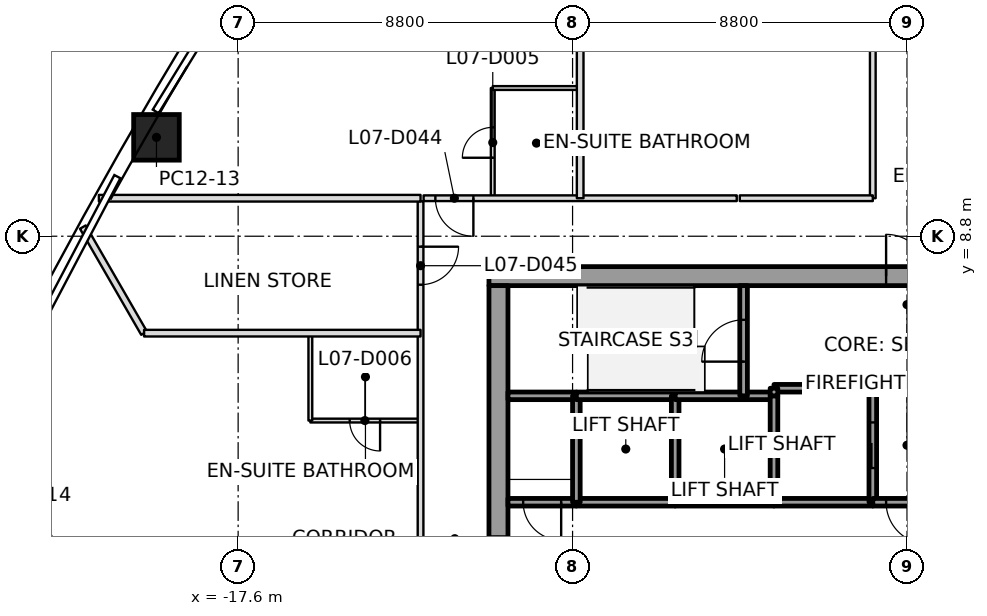
"""IFC4 building model, lengths in metres.
Left out: names, types, materials, properties, quantities, classifications, styles, units other than length and angle.
Written with IfcOpenShell. Run it as: python <this file> out.ifc"""

import sys

from ifc_helpers import new_model, si_unit, direction, frame, frame_2d, origin, origin_2d, place, context, subcontext, project, spatial, rectangle, extrude, clip, halfspace, element, fill, save


model = new_model("IFC4")
c1 = context("Model", 3, precision=1e-05, world=origin(), true_north=direction((0.0, 1.0)))
c2 = subcontext(c1, "Body", "Model", "MODEL_VIEW")
j1 = project(units=[si_unit("LENGTHUNIT", "METRE"), si_unit("PLANEANGLEUNIT", "RADIAN")], contexts=[c1])
p1 = place(None, origin())
s1 = spatial("IfcSite", under=j1, at=p1, CompositionType="ELEMENT")
p2 = place(p1, origin())
s2 = spatial("IfcBuilding", under=s1, at=p2, CompositionType="ELEMENT")
p3 = place(p2, frame((0.0, 0.0, 48.0)))
s3 = spatial("IfcBuildingStorey", under=s2, at=p3, CompositionType="ELEMENT", Elevation=48.0)
p4 = place(p3, frame((-19.749, 11.402, 0.0), z_axis=(0.010688729499, -0.00613612249, 0.999924046647), x_axis=(0.49997143695, 0.866041893524, -2.9922579e-05)))
e1 = element("IfcColumn", 1, at=p4, inside=s3, PredefinedType="COLUMN", context=c2, shape_type="SweptSolid", body=[
    clip(extrude(rectangle(XDim=1.2, YDim=1.2, at=origin_2d()), origin(), (0.0, 0.0, 1.0), 3.7), halfspace(frame((0.0, 0.0, 0.002)), True)),
])
p5 = place(p3, frame((-11.0, 7.75, 0.0), z_axis=(0.0, 0.0, 1.0), x_axis=(1.0, 0.0, 0.0)))
e2 = element("IfcWall", 2, at=p5, inside=s3, PredefinedType="SHEAR", context=c2, shape_type="SweptSolid", body=[
    extrude(rectangle(XDim=22.0, YDim=0.5, at=frame_2d((11.0, 0.0))), origin(), (0.0, 0.0, 1.0), 3.7),
])
p6 = place(p5, frame((10.45, 0.0, 0.0)))
e3 = element("IfcOpeningElement", 3, at=p6, cuts=e2, PredefinedType="OPENING", context=c2, shape_type="SweptSolid", body=[
    extrude(rectangle(XDim=1.1, YDim=2.1, at=frame_2d((0.55, 1.05))), frame((0.0, 0.25, 0.0), z_axis=(0.0, -1.0, 0.0), x_axis=(1.0, 0.0, 0.0)), (0.0, 0.0, 1.0), 0.5),
])
p7 = place(p3, frame((-10.75, -7.5, 0.0), z_axis=(0.0, 0.0, 1.0), x_axis=(0.0, 1.0, 0.0)))
e4 = element("IfcWall", 4, at=p7, inside=s3, PredefinedType="SHEAR", context=c2, shape_type="SweptSolid", body=[
    extrude(rectangle(XDim=15.0, YDim=0.5, at=frame_2d((7.5, 0.0))), origin(), (0.0, 0.0, 1.0), 3.7),
])
p8 = place(p7, frame((6.6, 0.0, 0.0)))
e5 = element("IfcOpeningElement", 5, at=p8, cuts=e4, PredefinedType="OPENING", context=c2, shape_type="SweptSolid", body=[
    extrude(rectangle(XDim=1.8, YDim=2.1, at=frame_2d((0.9, 1.05))), frame((0.0, 0.25, 0.0), z_axis=(0.0, -1.0, 0.0), x_axis=(1.0, 0.0, 0.0)), (0.0, 0.0, 1.0), 0.5),
])
p9 = place(p3, frame((-8.7, 1.8, 0.0), z_axis=(0.0, 0.0, 1.0), x_axis=(-1.0, 0.0, 0.0)))
e6 = element("IfcWall", 6, at=p9, inside=s3, PredefinedType="SOLIDWALL", context=c2, shape_type="SweptSolid", body=[
    extrude(rectangle(XDim=1.8, YDim=0.2, at=frame_2d((0.9, 0.0))), origin(), (0.0, 0.0, 1.0), 3.55),
])
p10 = place(p9, frame((0.4, 0.0, 0.0)))
e7 = element("IfcOpeningElement", 7, at=p10, cuts=e6, PredefinedType="OPENING", context=c2, shape_type="SweptSolid", body=[
    extrude(rectangle(XDim=1.0, YDim=2.1, at=frame_2d((0.5, 1.05))), frame((0.0, 0.1, 0.0), z_axis=(0.0, -1.0, 0.0), x_axis=(1.0, 0.0, 0.0)), (0.0, 0.0, 1.0), 0.2),
])
p11 = place(p3, frame((-8.7, 4.6, 0.0), z_axis=(0.0, 0.0, 1.0), x_axis=(-1.0, 0.0, 0.0)))
e8 = element("IfcWall", 8, at=p11, inside=s3, PredefinedType="SOLIDWALL", context=c2, shape_type="SweptSolid", body=[
    extrude(rectangle(XDim=1.8, YDim=0.2, at=frame_2d((0.9, 0.0))), origin(), (0.0, 0.0, 1.0), 3.55),
])
p12 = place(p3, frame((-6.1, 1.8, 0.0), z_axis=(0.0, 0.0, 1.0), x_axis=(-1.0, 0.0, 0.0)))
e9 = element("IfcWall", 9, at=p12, inside=s3, PredefinedType="SOLIDWALL", context=c2, shape_type="SweptSolid", body=[
    extrude(rectangle(XDim=2.6, YDim=0.2, at=frame_2d((1.3, 0.0))), origin(), (0.0, 0.0, 1.0), 3.55),
])
p13 = place(p3, frame((-8.7, 1.8, 0.0), z_axis=(0.0, 0.0, 1.0), x_axis=(0.0, 1.0, 0.0)))
e10 = element("IfcWall", 10, at=p13, inside=s3, PredefinedType="SOLIDWALL", context=c2, shape_type="SweptSolid", body=[
    extrude(rectangle(XDim=2.8, YDim=0.2, at=frame_2d((1.4, 0.0))), origin(), (0.0, 0.0, 1.0), 3.55),
])
p14 = place(p3, frame((-6.1, 4.6, 0.0), z_axis=(0.0, 0.0, 1.0), x_axis=(-1.0, 0.0, 0.0)))
e11 = element("IfcWall", 11, at=p14, inside=s3, PredefinedType="SOLIDWALL", context=c2, shape_type="SweptSolid", body=[
    extrude(rectangle(XDim=2.6, YDim=0.2, at=frame_2d((1.3, 0.0))), origin(), (0.0, 0.0, 1.0), 3.55),
])
p15 = place(p3, frame((-3.5, 1.8, 0.0), z_axis=(0.0, 0.0, 1.0), x_axis=(-1.0, 0.0, 0.0)))
e12 = element("IfcWall", 12, at=p15, inside=s3, PredefinedType="SOLIDWALL", context=c2, shape_type="SweptSolid", body=[
    extrude(rectangle(XDim=2.6, YDim=0.2, at=frame_2d((1.3, 0.0))), origin(), (0.0, 0.0, 1.0), 3.55),
])
p16 = place(p3, frame((-6.1, 1.8, 0.0), z_axis=(0.0, 0.0, 1.0), x_axis=(0.0, 1.0, 0.0)))
e13 = element("IfcWall", 13, at=p16, inside=s3, PredefinedType="SOLIDWALL", context=c2, shape_type="SweptSolid", body=[
    extrude(rectangle(XDim=2.8, YDim=0.2, at=frame_2d((1.4, 0.0))), origin(), (0.0, 0.0, 1.0), 3.55),
])
p17 = place(p3, frame((-4.3, 4.6, 0.0), z_axis=(0.0, 0.0, 1.0), x_axis=(-1.0, 0.0, 0.0)))
e14 = element("IfcWall", 14, at=p17, inside=s3, PredefinedType="SOLIDWALL", context=c2, shape_type="SweptSolid", body=[
    extrude(rectangle(XDim=1.8, YDim=0.2, at=frame_2d((0.9, 0.0))), origin(), (0.0, 0.0, 1.0), 3.55),
])
p18 = place(p3, frame((-3.5, 4.6, 0.0), z_axis=(0.0, 0.0, 1.0), x_axis=(-1.0, 0.0, 0.0)))
e15 = element("IfcWall", 15, at=p18, inside=s3, PredefinedType="SOLIDWALL", context=c2, shape_type="SweptSolid", body=[
    extrude(rectangle(XDim=0.8, YDim=0.2, at=frame_2d((0.4, 0.0))), origin(), (0.0, 0.0, 1.0), 3.55),
])
p19 = place(p3, frame((-4.3, 4.6, 0.0), z_axis=(0.0, 0.0, 1.0), x_axis=(0.0, 1.0, 0.0)))
e16 = element("IfcWall", 16, at=p19, inside=s3, PredefinedType="SOLIDWALL", context=c2, shape_type="SweptSolid", body=[
    extrude(rectangle(XDim=2.9, YDim=0.2, at=frame_2d((1.45, 0.0))), origin(), (0.0, 0.0, 1.0), 3.55),
])
p20 = place(p19, frame((0.9, 0.0, 0.0)))
e17 = element("IfcOpeningElement", 17, at=p20, cuts=e16, PredefinedType="OPENING", context=c2, shape_type="SweptSolid", body=[
    extrude(rectangle(XDim=1.1, YDim=2.1, at=frame_2d((0.55, 1.05))), frame((0.0, 0.1, 0.0), z_axis=(0.0, -1.0, 0.0), x_axis=(1.0, 0.0, 0.0)), (0.0, 0.0, 1.0), 0.2),
])
p21 = place(p3, frame((-0.9, 1.8, 0.0), z_axis=(0.0, 0.0, 1.0), x_axis=(-1.0, 0.0, 0.0)))
e18 = element("IfcWall", 18, at=p21, inside=s3, PredefinedType="SOLIDWALL", context=c2, shape_type="SweptSolid", body=[
    extrude(rectangle(XDim=2.6, YDim=0.2, at=frame_2d((1.3, 0.0))), origin(), (0.0, 0.0, 1.0), 3.55),
])
p22 = place(p3, frame((-3.5, 4.6, 0.0), z_axis=(0.0, 0.0, 1.0), x_axis=(0.0, -1.0, 0.0)))
e19 = element("IfcWall", 19, at=p22, inside=s3, PredefinedType="SOLIDWALL", context=c2, shape_type="SweptSolid", body=[
    extrude(rectangle(XDim=2.8, YDim=0.2, at=frame_2d((1.4, 0.0))), origin(), (0.0, 0.0, 1.0), 3.55),
])
p23 = place(p3, frame((-0.9, 1.8, 0.0), z_axis=(0.0, 0.0, 1.0), x_axis=(0.0, 1.0, 0.0)))
e20 = element("IfcWall", 20, at=p23, inside=s3, PredefinedType="SOLIDWALL", context=c2, shape_type="SweptSolid", body=[
    extrude(rectangle(XDim=3.0, YDim=0.2, at=frame_2d((1.5, 0.0))), origin(), (0.0, 0.0, 1.0), 3.55),
])
p24 = place(p23, frame((0.9, 0.0, 0.0)))
e21 = element("IfcOpeningElement", 21, at=p24, cuts=e20, PredefinedType="OPENING", context=c2, shape_type="SweptSolid", body=[
    extrude(rectangle(XDim=1.2, YDim=2.1, at=frame_2d((0.6, 1.05))), frame((0.0, 0.1, 0.0), z_axis=(0.0, -1.0, 0.0), x_axis=(1.0, 0.0, 0.0)), (0.0, 0.0, 1.0), 0.2),
])
p25 = place(p3, frame((-0.9, 4.8, 0.0), z_axis=(0.0, 0.0, 1.0), x_axis=(-1.0, 0.0, 0.0)))
e22 = element("IfcWall", 22, at=p25, inside=s3, PredefinedType="SOLIDWALL", context=c2, shape_type="SweptSolid", body=[
    extrude(rectangle(XDim=2.6, YDim=0.2, at=frame_2d((1.3, 0.0))), origin(), (0.0, 0.0, 1.0), 3.55),
])
p26 = place(p3, frame((-3.5, 4.8, 0.0), z_axis=(0.0, 0.0, 1.0), x_axis=(0.0, -1.0, 0.0)))
e23 = element("IfcWall", 23, at=p26, inside=s3, PredefinedType="SOLIDWALL", context=c2, shape_type="SweptSolid", body=[
    extrude(rectangle(XDim=0.2, YDim=0.2, at=frame_2d((0.1, 0.0))), origin(), (0.0, 0.0, 1.0), 3.55),
])
p27 = place(p3, frame((0.9, 1.8, 0.0), z_axis=(0.0, 0.0, 1.0), x_axis=(-1.0, 0.0, 0.0)))
e24 = element("IfcWall", 24, at=p27, inside=s3, PredefinedType="SOLIDWALL", context=c2, shape_type="SweptSolid", body=[
    extrude(rectangle(XDim=1.8, YDim=0.2, at=frame_2d((0.9, 0.0))), origin(), (0.0, 0.0, 1.0), 3.55),
])
p28 = place(p27, frame((0.35, 0.0, 0.0)))
e25 = element("IfcOpeningElement", 25, at=p28, cuts=e24, PredefinedType="OPENING", context=c2, shape_type="SweptSolid", body=[
    extrude(rectangle(XDim=1.1, YDim=2.1, at=frame_2d((0.55, 1.05))), frame((0.0, 0.1, 0.0), z_axis=(0.0, -1.0, 0.0), x_axis=(1.0, 0.0, 0.0)), (0.0, 0.0, 1.0), 0.2),
])
p29 = place(p3, frame((-17.213, -8.899, 0.0), z_axis=(0.0, 0.0, 1.0), x_axis=(-0.482265023756, 0.876025368846, 0.0)))
e26 = element("IfcWall", 26, at=p29, inside=s3, PredefinedType="PARTITIONING", context=c2, shape_type="SweptSolid", body=[
    extrude(rectangle(XDim=14.424, YDim=0.175, at=frame_2d((7.212, 0.0))), origin(), (0.0, 0.0, 1.0), 2.947),
])
p30 = place(p3, frame((-21.686, 9.041, 0.0), z_axis=(0.0, 0.0, 1.0), x_axis=(0.499975971767, -0.866039276047, 0.0)))
e27 = element("IfcWall", 27, at=p30, inside=s3, PredefinedType="PARTITIONING", context=c2, shape_type="SweptSolid", body=[
    extrude(rectangle(XDim=3.223, YDim=0.175, at=frame_2d((1.612, 0.0))), origin(), (0.0, 0.0, 1.0), 2.934),
])
p31 = place(p3, frame((-20.075, 6.249, 0.0), z_axis=(0.0, 0.0, 1.0), x_axis=(1.0, 0.0, 0.0)))
e28 = element("IfcWall", 28, at=p31, inside=s3, PredefinedType="PARTITIONING", context=c2, shape_type="SweptSolid", body=[
    extrude(rectangle(XDim=7.275, YDim=0.175, at=frame_2d((3.637, 0.0))), origin(), (0.0, 0.0, 1.0), 3.093),
])
p32 = place(p3, frame((-12.8, 9.8, 0.0), z_axis=(0.0, 0.0, 1.0), x_axis=(-1.0, 0.0, 0.0)))
e29 = element("IfcWall", 29, at=p32, inside=s3, PredefinedType="PARTITIONING", context=c2, shape_type="SweptSolid", body=[
    extrude(rectangle(XDim=8.464, YDim=0.175, at=frame_2d((4.232, 0.0))), origin(), (0.0, 0.0, 1.0), 2.934),
])
p33 = place(p3, frame((-8.6, 9.8, 0.0), z_axis=(0.0, 0.0, 1.0), x_axis=(0.0, 1.0, 0.0)))
e30 = element("IfcWall", 30, at=p33, inside=s3, PredefinedType="PARTITIONING", context=c2, shape_type="SweptSolid", body=[
    extrude(rectangle(XDim=18.995, YDim=0.175, at=frame_2d((9.497, 0.0))), origin(), (0.0, 0.0, 1.0), 2.934),
])
p34 = place(p3, frame((-12.8, 9.72, 0.0), z_axis=(0.0, 0.0, 1.0), x_axis=(0.0, -1.0, 0.0)))
e31 = element("IfcWall", 31, at=p34, inside=s3, PredefinedType="PARTITIONING", context=c2, shape_type="SweptSolid", body=[
    extrude(rectangle(XDim=16.071, YDim=0.15, at=frame_2d((8.035, 0.0))), origin(), (0.0, 0.0, 1.0), 3.017),
])
p35 = place(p34, frame((1.195, 0.0, 0.0)))
e32 = element("IfcOpeningElement", 32, at=p35, cuts=e31, PredefinedType="OPENING", context=c2, shape_type="SweptSolid", body=[
    extrude(rectangle(XDim=1.0, YDim=2.1, at=frame_2d((0.5, 1.05))), frame((0.0, 0.075, 0.0), z_axis=(0.0, -1.0, 0.0), x_axis=(1.0, 0.0, 0.0)), (0.0, 0.0, 1.0), 0.15),
])
p36 = place(p34, frame((10.471, 0.0, 0.0)))
e33 = element("IfcOpeningElement", 33, at=p36, cuts=e31, PredefinedType="OPENING", context=c2, shape_type="SweptSolid", body=[
    extrude(rectangle(XDim=1.0, YDim=2.1, at=frame_2d((0.5, 1.05))), frame((0.0, 0.075, 0.0), z_axis=(0.0, -1.0, 0.0), x_axis=(1.0, 0.0, 0.0)), (0.0, 0.0, 1.0), 0.15),
])
p37 = place(p3, frame((-4.48, 9.8, 0.0), z_axis=(0.0, 0.0, 1.0), x_axis=(-1.0, 0.0, 0.0)))
e34 = element("IfcWall", 34, at=p37, inside=s3, PredefinedType="PARTITIONING", context=c2, shape_type="SweptSolid", body=[
    extrude(rectangle(XDim=8.24, YDim=0.15, at=frame_2d((4.12, 0.0))), origin(), (0.0, 0.0, 1.0), 3.017),
])
p38 = place(p37, frame((6.93, 0.0, 0.0)))
e35 = element("IfcOpeningElement", 35, at=p38, cuts=e34, PredefinedType="OPENING", context=c2, shape_type="SweptSolid", body=[
    extrude(rectangle(XDim=1.0, YDim=2.1, at=frame_2d((0.5, 1.05))), frame((0.0, 0.075, 0.0), z_axis=(0.0, -1.0, 0.0), x_axis=(1.0, 0.0, 0.0)), (0.0, 0.0, 1.0), 0.15),
])
p39 = place(p3, frame((-0.9, 27.756, 0.0), z_axis=(0.0, 0.0, 1.0), x_axis=(0.0, -1.0, 0.0)))
e36 = element("IfcWall", 36, at=p39, inside=s3, PredefinedType="PARTITIONING", context=c2, shape_type="SweptSolid", body=[
    extrude(rectangle(XDim=17.956, YDim=0.15, at=frame_2d((8.978, 0.0))), origin(), (0.0, 0.0, 1.0), 2.947),
])
p40 = place(p39, frame((9.678, 0.0, 0.0)))
e37 = element("IfcOpeningElement", 37, at=p40, cuts=e36, PredefinedType="OPENING", context=c2, shape_type="SweptSolid", body=[
    extrude(rectangle(XDim=1.0, YDim=2.1, at=frame_2d((0.5, 1.05))), frame((0.0, 0.075, 0.0), z_axis=(0.0, -1.0, 0.0), x_axis=(1.0, 0.0, 0.0)), (0.0, 0.0, 1.0), 0.15),
])
p41 = place(p3, frame((-0.9, 9.8, 0.0), z_axis=(0.0, 0.0, 1.0), x_axis=(-1.0, 0.0, 0.0)))
e38 = element("IfcWall", 38, at=p41, inside=s3, PredefinedType="PARTITIONING", context=c2, shape_type="SweptSolid", body=[
    extrude(rectangle(XDim=3.5, YDim=0.15, at=frame_2d((1.75, 0.0))), origin(), (0.0, 0.0, 1.0), 2.947),
])
p42 = place(p3, frame((-12.83, 3.949, 0.0), z_axis=(0.0, 0.0, 1.0), x_axis=(-1.0, 0.0, 0.0)))
e39 = element("IfcWall", 39, at=p42, inside=s3, PredefinedType="PARTITIONING", context=c2, shape_type="SweptSolid", body=[
    extrude(rectangle(XDim=2.87, YDim=0.1, at=frame_2d((1.435, 0.0))), origin(), (0.0, 0.0, 1.0), 3.093),
])
p43 = place(p42, frame((1.035, 0.0, 0.0)))
e40 = element("IfcOpeningElement", 40, at=p43, cuts=e39, PredefinedType="OPENING", context=c2, shape_type="SweptSolid", body=[
    extrude(rectangle(XDim=0.8, YDim=2.1, at=frame_2d((0.4, 1.05))), frame((0.0, 0.05, 0.0), z_axis=(0.0, -1.0, 0.0), x_axis=(1.0, 0.0, 0.0)), (0.0, 0.0, 1.0), 0.1),
])
p44 = place(p3, frame((-15.7, 3.949, 0.0), z_axis=(0.0, 0.0, 1.0), x_axis=(0.0, 1.0, 0.0)))
e41 = element("IfcWall", 41, at=p44, inside=s3, PredefinedType="PARTITIONING", context=c2, shape_type="SweptSolid", body=[
    extrude(rectangle(XDim=2.27, YDim=0.1, at=frame_2d((1.135, 0.0))), origin(), (0.0, 0.0, 1.0), 3.093),
])
p45 = place(p3, frame((-10.9, 9.83, 0.0), z_axis=(0.0, 0.0, 1.0), x_axis=(0.0, 1.0, 0.0)))
e42 = element("IfcWall", 42, at=p45, inside=s3, PredefinedType="PARTITIONING", context=c2, shape_type="SweptSolid", body=[
    extrude(rectangle(XDim=2.87, YDim=0.1, at=frame_2d((1.435, 0.0))), origin(), (0.0, 0.0, 1.0), 3.017),
])
p46 = place(p45, frame((1.035, 0.0, 0.0)))
e43 = element("IfcOpeningElement", 43, at=p46, cuts=e42, PredefinedType="OPENING", context=c2, shape_type="SweptSolid", body=[
    extrude(rectangle(XDim=0.8, YDim=2.1, at=frame_2d((0.4, 1.05))), frame((0.0, 0.05, 0.0), z_axis=(0.0, -1.0, 0.0), x_axis=(1.0, 0.0, 0.0)), (0.0, 0.0, 1.0), 0.1),
])
p47 = place(p3, frame((-10.9, 12.7, 0.0), z_axis=(0.0, 0.0, 1.0), x_axis=(1.0, 0.0, 0.0)))
e44 = element("IfcWall", 44, at=p47, inside=s3, PredefinedType="PARTITIONING", context=c2, shape_type="SweptSolid", body=[
    extrude(rectangle(XDim=2.27, YDim=0.1, at=frame_2d((1.135, 0.0))), origin(), (0.0, 0.0, 1.0), 2.947),
])
p48 = place(p38, origin())
e45 = element("IfcDoor", 45, at=p48, inside=s3, OperationType="SINGLE_SWING_LEFT", PredefinedType="DOOR", context=c2, shape_type="SweptSolid", body=[
    extrude(rectangle(XDim=1.0, YDim=2.1, at=frame_2d((0.5, 1.05))), frame((0.0, 0.025, 0.0), z_axis=(0.0, -1.0, 0.0), x_axis=(1.0, 0.0, 0.0)), (0.0, 0.0, 1.0), 0.05),
])
fill(e35, e45)
p49 = place(p46, origin())
e46 = element("IfcDoor", 46, at=p49, inside=s3, OperationType="SINGLE_SWING_RIGHT", PredefinedType="DOOR", context=c2, shape_type="SweptSolid", body=[
    extrude(rectangle(XDim=0.8, YDim=2.1, at=frame_2d((0.4, 1.05))), frame((0.0, 0.025, 0.0), z_axis=(0.0, -1.0, 0.0), x_axis=(1.0, 0.0, 0.0)), (0.0, 0.0, 1.0), 0.05),
])
fill(e43, e46)
p50 = place(p35, origin())
e47 = element("IfcDoor", 47, at=p50, inside=s3, OperationType="SINGLE_SWING_LEFT", PredefinedType="DOOR", context=c2, shape_type="SweptSolid", body=[
    extrude(rectangle(XDim=1.0, YDim=2.1, at=frame_2d((0.5, 1.05))), frame((0.0, 0.025, 0.0), z_axis=(0.0, -1.0, 0.0), x_axis=(1.0, 0.0, 0.0)), (0.0, 0.0, 1.0), 0.05),
])
fill(e32, e47)
p51 = place(p43, origin())
e48 = element("IfcDoor", 48, at=p51, inside=s3, OperationType="SINGLE_SWING_RIGHT", PredefinedType="DOOR", context=c2, shape_type="SweptSolid", body=[
    extrude(rectangle(XDim=0.8, YDim=2.1, at=frame_2d((0.4, 1.05))), frame((0.0, 0.025, 0.0), z_axis=(0.0, -1.0, 0.0), x_axis=(1.0, 0.0, 0.0)), (0.0, 0.0, 1.0), 0.05),
])
fill(e40, e48)
p52 = place(p24, origin())
e49 = element("IfcDoor", 49, at=p52, inside=s3, OperationType="SLIDING_TO_LEFT", PredefinedType="DOOR", context=c2, shape_type="SweptSolid", body=[
    extrude(rectangle(XDim=1.2, YDim=2.1, at=frame_2d((0.6, 1.05))), frame((0.0, 0.025, 0.0), z_axis=(0.0, -1.0, 0.0), x_axis=(1.0, 0.0, 0.0)), (0.0, 0.0, 1.0), 0.05),
])
fill(e21, e49)
p53 = place(p28, origin())
e50 = element("IfcDoor", 50, at=p53, inside=s3, OperationType="SINGLE_SWING_LEFT", PredefinedType="DOOR", context=c2, shape_type="SweptSolid", body=[
    extrude(rectangle(XDim=1.1, YDim=2.1, at=frame_2d((0.55, 1.05))), frame((0.0, 0.025, 0.0), z_axis=(0.0, -1.0, 0.0), x_axis=(1.0, 0.0, 0.0)), (0.0, 0.0, 1.0), 0.05),
])
fill(e25, e50)
p54 = place(p10, origin())
e51 = element("IfcDoor", 51, at=p54, inside=s3, OperationType="SINGLE_SWING_LEFT", PredefinedType="DOOR", context=c2, shape_type="SweptSolid", body=[
    extrude(rectangle(XDim=1.0, YDim=2.1, at=frame_2d((0.5, 1.05))), frame((0.0, 0.025, 0.0), z_axis=(0.0, -1.0, 0.0), x_axis=(1.0, 0.0, 0.0)), (0.0, 0.0, 1.0), 0.05),
])
fill(e7, e51)
p55 = place(p20, origin())
e52 = element("IfcDoor", 52, at=p55, inside=s3, OperationType="SINGLE_SWING_LEFT", PredefinedType="DOOR", context=c2, shape_type="SweptSolid", body=[
    extrude(rectangle(XDim=1.1, YDim=2.1, at=frame_2d((0.55, 1.05))), frame((0.0, 0.025, 0.0), z_axis=(0.0, -1.0, 0.0), x_axis=(1.0, 0.0, 0.0)), (0.0, 0.0, 1.0), 0.05),
])
fill(e17, e52)
p56 = place(p8, origin())
e53 = element("IfcDoor", 53, at=p56, inside=s3, OperationType="DOUBLE_DOOR_SINGLE_SWING", PredefinedType="DOOR", context=c2, shape_type="SweptSolid", body=[
    extrude(rectangle(XDim=1.8, YDim=2.1, at=frame_2d((0.9, 1.05))), frame((0.0, 0.025, 0.0), z_axis=(0.0, -1.0, 0.0), x_axis=(1.0, 0.0, 0.0)), (0.0, 0.0, 1.0), 0.05),
])
fill(e5, e53)
p57 = place(p6, origin())
e54 = element("IfcDoor", 54, at=p57, inside=s3, OperationType="SINGLE_SWING_RIGHT", PredefinedType="DOOR", context=c2, shape_type="SweptSolid", body=[
    extrude(rectangle(XDim=1.1, YDim=2.1, at=frame_2d((0.55, 1.05))), frame((0.0, 0.025, 0.0), z_axis=(0.0, -1.0, 0.0), x_axis=(1.0, 0.0, 0.0)), (0.0, 0.0, 1.0), 0.05),
])
fill(e3, e54)
save(model, sys.argv[1])
